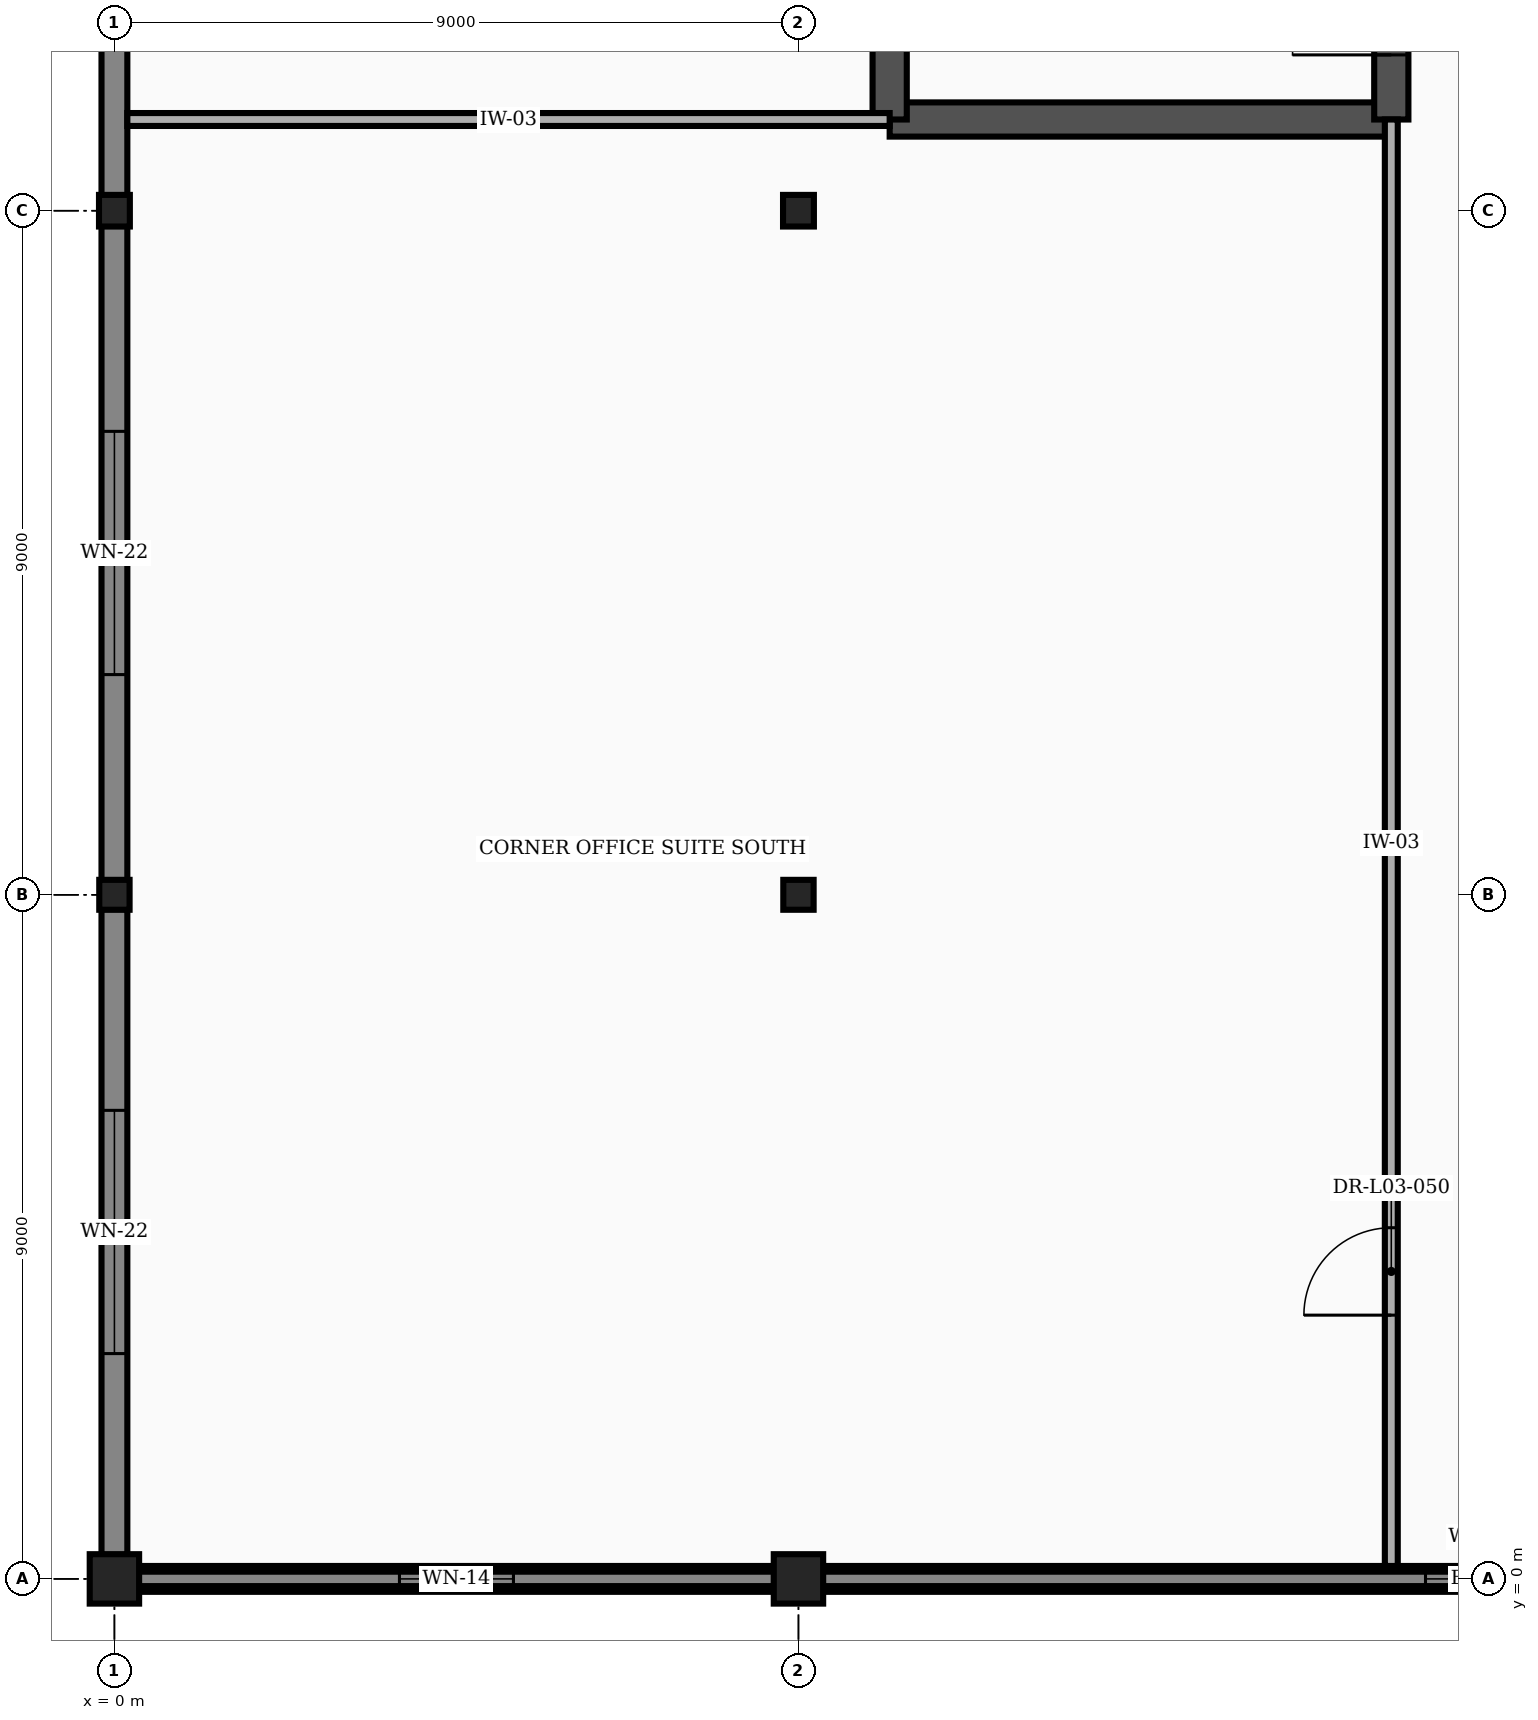
"""IFC4 building model, lengths in metres.
Left out: names, types, materials, properties, quantities, classifications, styles, units other than length and angle.
Written with IfcOpenShell. Run it as: python <this file> out.ifc"""

import sys

from ifc_helpers import new_model, si_unit, direction, frame, frame_2d, origin, origin_with_axes, origin_2d, place, context, subcontext, project, spatial, rectangle, i_section, extrude, element, fill, save


model = new_model("IFC4")
c1 = context("Model", 3, precision=1e-05, world=origin(), true_north=direction((0.0, 1.0)))
c2 = subcontext(c1, "Body", "Model", "MODEL_VIEW")
j1 = project(units=[si_unit("LENGTHUNIT", "METRE"), si_unit("PLANEANGLEUNIT", "RADIAN")], contexts=[c1])
p1 = place(None, origin())
s1 = spatial("IfcSite", under=j1, at=p1, CompositionType="ELEMENT")
p2 = place(p1, origin())
s2 = spatial("IfcBuilding", under=s1, at=p2, CompositionType="ELEMENT")
p3 = place(p2, frame((0.0, 0.0, 16.8)))
s3 = spatial("IfcBuildingStorey", under=s2, at=p3, CompositionType="ELEMENT", Elevation=16.8)
p4 = place(p3, origin_with_axes())
e1 = element("IfcColumn", 1, at=p4, inside=s3, PredefinedType="COLUMN", context=c2, shape_type="SweptSolid", body=[
    extrude(rectangle(XDim=0.65, YDim=0.65, at=origin_2d()), origin(), (0.0, 0.0, 1.0), 4.8),
])
p5 = place(p3, frame((0.0, 9.0, 0.0), z_axis=(0.0, 0.0, 1.0), x_axis=(1.0, 0.0, 0.0)))
e2 = element("IfcColumn", 2, at=p5, inside=s3, PredefinedType="COLUMN", context=c2, shape_type="SweptSolid", body=[
    extrude(i_section(OverallWidth=0.399, OverallDepth=0.394, WebThickness=0.023, FlangeThickness=0.037, at=origin_2d()), origin(), (0.0, 0.0, 1.0), 4.8),
])
p6 = place(p3, frame((0.0, 18.0, 0.0), z_axis=(0.0, 0.0, 1.0), x_axis=(1.0, 0.0, 0.0)))
e3 = element("IfcColumn", 3, at=p6, inside=s3, PredefinedType="COLUMN", context=c2, shape_type="SweptSolid", body=[
    extrude(i_section(OverallWidth=0.406, OverallDepth=0.416, WebThickness=0.03, FlangeThickness=0.048, at=origin_2d()), origin(), (0.0, 0.0, 1.0), 4.8),
])
p7 = place(p3, frame((9.0, 0.0, 0.0), z_axis=(0.0, 0.0, 1.0), x_axis=(1.0, 0.0, 0.0)))
e4 = element("IfcColumn", 4, at=p7, inside=s3, PredefinedType="COLUMN", context=c2, shape_type="SweptSolid", body=[
    extrude(rectangle(XDim=0.65, YDim=0.65, at=origin_2d()), origin(), (0.0, 0.0, 1.0), 4.8),
])
p8 = place(p3, frame((9.0, 9.0, 0.0), z_axis=(0.0, 0.0, 1.0), x_axis=(1.0, 0.0, 0.0)))
e5 = element("IfcColumn", 5, at=p8, inside=s3, PredefinedType="COLUMN", context=c2, shape_type="SweptSolid", body=[
    extrude(i_section(OverallWidth=0.399, OverallDepth=0.394, WebThickness=0.023, FlangeThickness=0.037, at=origin_2d()), origin(), (0.0, 0.0, 1.0), 4.8),
])
p9 = place(p3, frame((9.0, 18.0, 0.0), z_axis=(0.0, 0.0, 1.0), x_axis=(1.0, 0.0, 0.0)))
e6 = element("IfcColumn", 6, at=p9, inside=s3, PredefinedType="COLUMN", context=c2, shape_type="SweptSolid", body=[
    extrude(i_section(OverallWidth=0.406, OverallDepth=0.416, WebThickness=0.03, FlangeThickness=0.048, at=origin_2d()), origin(), (0.0, 0.0, 1.0), 4.8),
])
p10 = place(p3, frame((0.317, 0.0, 0.0), z_axis=(0.0, 0.0, 1.0), x_axis=(1.0, 0.0, 0.0)))
e7 = element("IfcWall", 7, at=p10, inside=s3, PredefinedType="STANDARD", context=c2, shape_type="SweptSolid", body=[
    extrude(rectangle(XDim=8.366, YDim=0.34, at=frame_2d((4.183, 0.0))), origin(), (0.0, 0.0, 1.0), 4.048),
])
p11 = place(p10, frame((3.433, 0.0, 0.85)))
e8 = element("IfcOpeningElement", 8, at=p11, cuts=e7, PredefinedType="OPENING", context=c2, shape_type="SweptSolid", body=[
    extrude(rectangle(XDim=1.5, YDim=1.8, at=frame_2d((0.75, 0.9))), frame((0.0, 0.182, 0.0), z_axis=(0.0, -1.0, 0.0), x_axis=(1.0, 0.0, 0.0)), (0.0, 0.0, 1.0), 0.364),
])
p12 = place(p3, frame((9.317, 0.0, 0.0), z_axis=(0.0, 0.0, 1.0), x_axis=(1.0, 0.0, 0.0)))
e9 = element("IfcWall", 9, at=p12, inside=s3, PredefinedType="STANDARD", context=c2, shape_type="SweptSolid", body=[
    extrude(rectangle(XDim=17.366, YDim=0.34, at=frame_2d((8.683, 0.0))), origin(), (0.0, 0.0, 1.0), 4.048),
])
p13 = place(p12, frame((7.933, 0.0, 0.85)))
e10 = element("IfcOpeningElement", 10, at=p13, cuts=e9, PredefinedType="OPENING", context=c2, shape_type="SweptSolid", body=[
    extrude(rectangle(XDim=1.5, YDim=1.8, at=frame_2d((0.75, 0.9))), frame((0.0, 0.182, 0.0), z_axis=(0.0, -1.0, 0.0), x_axis=(1.0, 0.0, 0.0)), (0.0, 0.0, 1.0), 0.364),
])
p14 = place(p3, frame((0.0, 0.317, 0.0), z_axis=(0.0, 0.0, 1.0), x_axis=(0.0, 1.0, 0.0)))
e11 = element("IfcWall", 11, at=p14, inside=s3, PredefinedType="STANDARD", context=c2, shape_type="SweptSolid", body=[
    extrude(rectangle(XDim=8.495, YDim=0.34, at=frame_2d((4.247, 0.0))), origin(), (0.0, 0.0, 1.0), 4.048),
])
p15 = place(p14, frame((2.647, 0.0, 0.85)))
e12 = element("IfcOpeningElement", 12, at=p15, cuts=e11, PredefinedType="OPENING", context=c2, shape_type="SweptSolid", body=[
    extrude(rectangle(XDim=3.2, YDim=2.2, at=frame_2d((1.6, 1.1))), frame((0.0, 0.182, 0.0), z_axis=(0.0, -1.0, 0.0), x_axis=(1.0, 0.0, 0.0)), (0.0, 0.0, 1.0), 0.364),
])
p16 = place(p3, frame((0.0, 9.188, 0.0), z_axis=(0.0, 0.0, 1.0), x_axis=(0.0, 1.0, 0.0)))
e13 = element("IfcWall", 13, at=p16, inside=s3, PredefinedType="STANDARD", context=c2, shape_type="SweptSolid", body=[
    extrude(rectangle(XDim=8.617, YDim=0.34, at=frame_2d((4.309, 0.0))), origin(), (0.0, 0.0, 1.0), 4.555),
])
p17 = place(p16, frame((2.709, 0.0, 0.85)))
e14 = element("IfcOpeningElement", 14, at=p17, cuts=e13, PredefinedType="OPENING", context=c2, shape_type="SweptSolid", body=[
    extrude(rectangle(XDim=3.2, YDim=2.2, at=frame_2d((1.6, 1.1))), frame((0.0, 0.182, 0.0), z_axis=(0.0, -1.0, 0.0), x_axis=(1.0, 0.0, 0.0)), (0.0, 0.0, 1.0), 0.364),
])
p18 = place(p3, frame((0.0, 18.194, 0.0), z_axis=(0.0, 0.0, 1.0), x_axis=(0.0, 1.0, 0.0)))
e15 = element("IfcWall", 15, at=p18, inside=s3, PredefinedType="STANDARD", context=c2, shape_type="SweptSolid", body=[
    extrude(rectangle(XDim=17.612, YDim=0.34, at=frame_2d((8.806, 0.0))), origin(), (0.0, 0.0, 1.0), 3.943),
])
p19 = place(p18, frame((7.206, 0.0, 0.85)))
e16 = element("IfcOpeningElement", 16, at=p19, cuts=e15, PredefinedType="OPENING", context=c2, shape_type="SweptSolid", body=[
    extrude(rectangle(XDim=3.2, YDim=2.2, at=frame_2d((1.6, 1.1))), frame((0.0, 0.182, 0.0), z_axis=(0.0, -1.0, 0.0), x_axis=(1.0, 0.0, 0.0)), (0.0, 0.0, 1.0), 0.364),
])
p20 = place(p3, frame((0.0, 0.0, 4.8), z_axis=(0.0, 0.0, 1.0), x_axis=(1.0, 0.0, 0.0)))
e17 = element("IfcWall", 17, at=p20, inside=s3, PredefinedType="PARAPET", context=c2, shape_type="SweptSolid", body=[
    extrude(rectangle(XDim=45.0, YDim=0.19, at=frame_2d((22.5, 0.0))), origin(), (0.0, 0.0, 1.0), 1.2),
])
p21 = place(p3, frame((10.2, 19.2, 0.0), z_axis=(0.0, 0.0, 1.0), x_axis=(1.0, 0.0, 0.0)))
e18 = element("IfcWall", 18, at=p21, inside=s3, PredefinedType="SHEAR", context=c2, shape_type="SweptSolid", body=[
    extrude(rectangle(XDim=6.6, YDim=0.45, at=frame_2d((3.3, 0.0))), origin(), (0.0, 0.0, 1.0), 4.555),
])
p22 = place(p3, frame((10.2, 19.2, 0.0), z_axis=(0.0, 0.0, 1.0), x_axis=(0.0, 1.0, 0.0)))
e19 = element("IfcWall", 19, at=p22, inside=s3, PredefinedType="SHEAR", context=c2, shape_type="SweptSolid", body=[
    extrude(rectangle(XDim=15.6, YDim=0.45, at=frame_2d((7.8, 0.0))), origin(), (0.0, 0.0, 1.0), 4.555),
])
p23 = place(p3, frame((16.8, 19.2, 0.0), z_axis=(0.0, 0.0, 1.0), x_axis=(0.0, 1.0, 0.0)))
e20 = element("IfcWall", 20, at=p23, inside=s3, PredefinedType="SHEAR", context=c2, shape_type="SweptSolid", body=[
    extrude(rectangle(XDim=9.585, YDim=0.45, at=frame_2d((4.792, 0.0))), origin(), (0.0, 0.0, 1.0), 4.555),
])
p24 = place(p23, frame((0.85, 0.0, 0.0)))
e21 = element("IfcOpeningElement", 21, at=p24, cuts=e20, PredefinedType="OPENING", context=c2, shape_type="SweptSolid", body=[
    extrude(rectangle(XDim=1.3, YDim=2.2, at=frame_2d((0.65, 1.1))), frame((0.0, 0.237, 0.0), z_axis=(0.0, -1.0, 0.0), x_axis=(1.0, 0.0, 0.0)), (0.0, 0.0, 1.0), 0.474),
])
p25 = place(p3, frame((0.17, 19.2, 0.0), z_axis=(0.0, 0.0, 1.0), x_axis=(1.0, 0.0, 0.0)))
e22 = element("IfcWall", 22, at=p25, inside=s3, PredefinedType="PARTITIONING", context=c2, shape_type="SweptSolid", body=[
    extrude(rectangle(XDim=10.03, YDim=0.17, at=frame_2d((5.015, 0.0))), origin(), (0.0, 0.0, 1.0), 4.555),
])
p26 = place(p3, frame((16.8, 0.17, 0.0), z_axis=(0.0, 0.0, 1.0), x_axis=(0.0, 1.0, 0.0)))
e23 = element("IfcWall", 23, at=p26, inside=s3, PredefinedType="PARTITIONING", context=c2, shape_type="SweptSolid", body=[
    extrude(rectangle(XDim=19.03, YDim=0.17, at=frame_2d((9.515, 0.0))), origin(), (0.0, 0.0, 1.0), 4.555),
])
p27 = place(p26, frame((3.3, 0.0, 0.0)))
e24 = element("IfcOpeningElement", 24, at=p27, cuts=e23, PredefinedType="OPENING", context=c2, shape_type="SweptSolid", body=[
    extrude(rectangle(XDim=1.15, YDim=2.15, at=frame_2d((0.575, 1.075))), frame((0.0, 0.097, 0.0), z_axis=(0.0, -1.0, 0.0), x_axis=(1.0, 0.0, 0.0)), (0.0, 0.0, 1.0), 0.194),
])
p28 = place(p11, origin())
e25 = element("IfcWindow", 25, at=p28, inside=s3, PartitioningType="SINGLE_PANEL", PredefinedType="WINDOW", context=c2, shape_type="SweptSolid", body=[
    extrude(rectangle(XDim=1.5, YDim=1.8, at=frame_2d((0.75, 0.9))), frame((0.0, 0.03, 0.0), z_axis=(0.0, -1.0, 0.0), x_axis=(1.0, 0.0, 0.0)), (0.0, 0.0, 1.0), 0.06),
])
fill(e8, e25)
p29 = place(p13, origin())
e26 = element("IfcWindow", 26, at=p29, inside=s3, PartitioningType="SINGLE_PANEL", PredefinedType="WINDOW", context=c2, shape_type="SweptSolid", body=[
    extrude(rectangle(XDim=1.5, YDim=1.8, at=frame_2d((0.75, 0.9))), frame((0.0, 0.03, 0.0), z_axis=(0.0, -1.0, 0.0), x_axis=(1.0, 0.0, 0.0)), (0.0, 0.0, 1.0), 0.06),
])
fill(e10, e26)
p30 = place(p15, origin())
e27 = element("IfcWindow", 27, at=p30, inside=s3, PartitioningType="SINGLE_PANEL", PredefinedType="WINDOW", context=c2, shape_type="SweptSolid", body=[
    extrude(rectangle(XDim=3.2, YDim=2.2, at=frame_2d((1.6, 1.1))), frame((0.0, 0.03, 0.0), z_axis=(0.0, -1.0, 0.0), x_axis=(1.0, 0.0, 0.0)), (0.0, 0.0, 1.0), 0.06),
])
fill(e12, e27)
p31 = place(p17, origin())
e28 = element("IfcWindow", 28, at=p31, inside=s3, PartitioningType="SINGLE_PANEL", PredefinedType="WINDOW", context=c2, shape_type="SweptSolid", body=[
    extrude(rectangle(XDim=3.2, YDim=2.2, at=frame_2d((1.6, 1.1))), frame((0.0, 0.03, 0.0), z_axis=(0.0, -1.0, 0.0), x_axis=(1.0, 0.0, 0.0)), (0.0, 0.0, 1.0), 0.06),
])
fill(e14, e28)
p32 = place(p24, origin())
e29 = element("IfcDoor", 29, at=p32, inside=s3, OperationType="SINGLE_SWING_LEFT", PredefinedType="DOOR", context=c2, shape_type="SweptSolid", body=[
    extrude(rectangle(XDim=1.3, YDim=2.2, at=frame_2d((0.65, 1.1))), frame((0.0, 0.025, 0.0), z_axis=(0.0, -1.0, 0.0), x_axis=(1.0, 0.0, 0.0)), (0.0, 0.0, 1.0), 0.05),
])
fill(e21, e29)
p33 = place(p27, origin())
e30 = element("IfcDoor", 30, at=p33, inside=s3, OperationType="SINGLE_SWING_LEFT", PredefinedType="DOOR", context=c2, shape_type="SweptSolid", body=[
    extrude(rectangle(XDim=1.15, YDim=2.15, at=frame_2d((0.575, 1.075))), frame((0.0, 0.025, 0.0), z_axis=(0.0, -1.0, 0.0), x_axis=(1.0, 0.0, 0.0)), (0.0, 0.0, 1.0), 0.05),
])
fill(e24, e30)
save(model, sys.argv[1])
